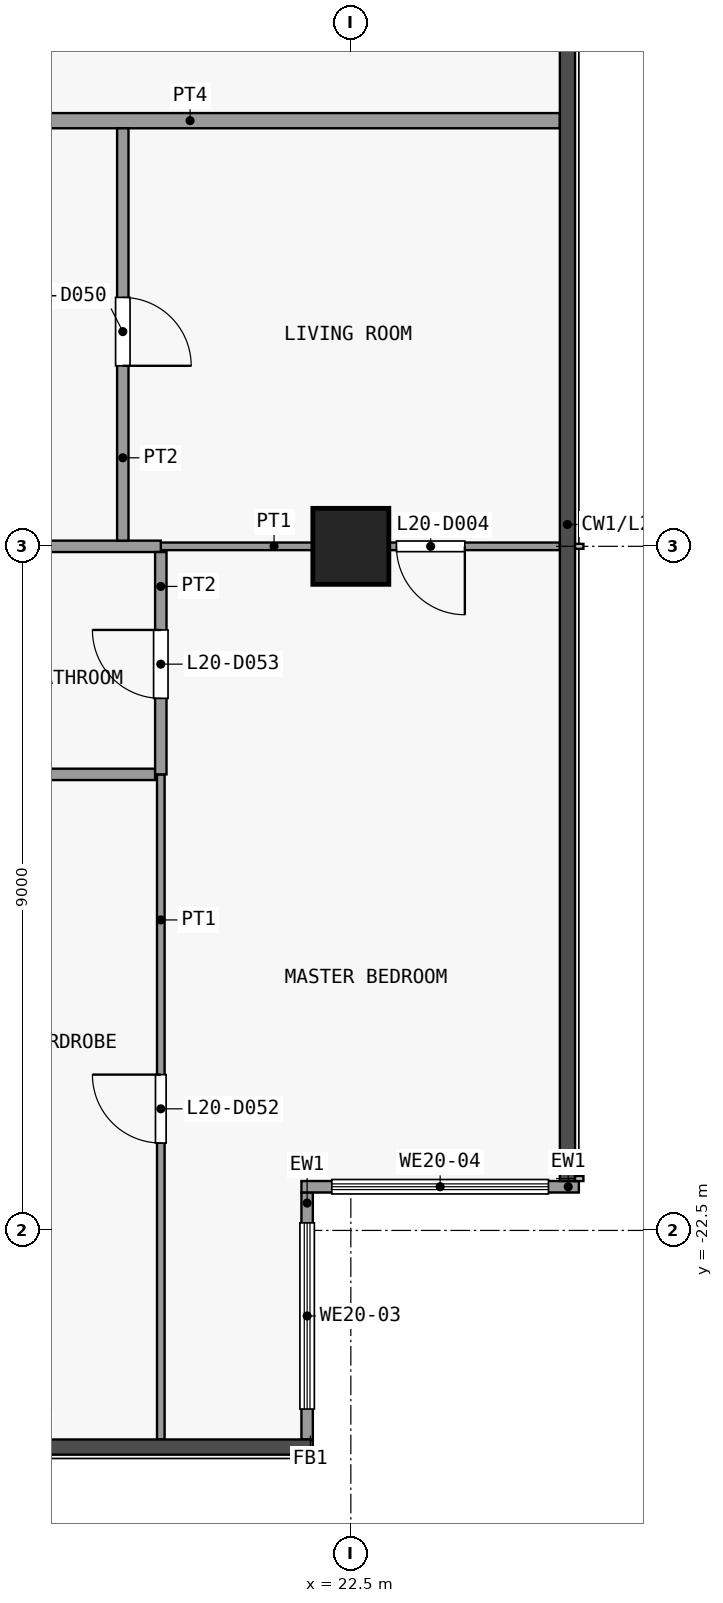
"""IFC4 building model, lengths in metres.
Left out: names, types, materials, properties, quantities, classifications, styles, units other than length and angle.
Written with IfcOpenShell. Run it as: python <this file> out.ifc"""

import sys

from ifc_helpers import new_model, si_unit, direction, frame, frame_2d, origin, origin_2d, place, context, subcontext, project, spatial, rectangle, extrude, element, fill, save


model = new_model("IFC4")
c1 = context("Model", 3, precision=1e-05, world=origin(), true_north=direction((0.0, 1.0)))
c2 = subcontext(c1, "Body", "Model", "MODEL_VIEW")
j1 = project(units=[si_unit("LENGTHUNIT", "METRE"), si_unit("PLANEANGLEUNIT", "RADIAN")], contexts=[c1])
p1 = place(None, origin())
s1 = spatial("IfcSite", under=j1, at=p1, CompositionType="ELEMENT")
p2 = place(p1, origin())
s2 = spatial("IfcBuilding", under=s1, at=p2, CompositionType="ELEMENT")
p3 = place(p2, frame((0.0, 0.0, 84.7)))
s3 = spatial("IfcBuildingStorey", under=s2, at=p3, CompositionType="ELEMENT", Elevation=84.7)
p4 = place(p3, frame((22.5, -13.5, 0.0), z_axis=(0.0, 0.0, 1.0), x_axis=(1.0, 0.0, 0.0)))
e1 = element("IfcColumn", 1, at=p4, inside=s3, PredefinedType="COLUMN", context=c2, shape_type="SweptSolid", body=[
    extrude(rectangle(XDim=1.0, YDim=1.0, at=origin_2d()), origin(), (0.0, 0.0, 1.0), 3.6),
])
p5 = place(p3, frame((21.925, -22.0, 0.0), z_axis=(0.0, 0.0, 1.0), x_axis=(0.0, -1.0, 0.0)))
e2 = element("IfcWall", 2, at=p5, inside=s3, PredefinedType="SOLIDWALL", context=c2, shape_type="SweptSolid", body=[
    extrude(rectangle(XDim=3.25, YDim=0.15, at=frame_2d((1.625, 0.0))), origin(), (0.0, 0.0, 1.0), 3.3),
])
p6 = place(p5, frame((0.4, 0.0, 0.9)))
e3 = element("IfcOpeningElement", 3, at=p6, cuts=e2, PredefinedType="OPENING", context=c2, shape_type="SweptSolid", body=[
    extrude(rectangle(XDim=2.45, YDim=2.4, at=frame_2d((1.225, 1.2))), frame((0.0, 0.085, 0.0), z_axis=(0.0, -1.0, 0.0), x_axis=(1.0, 0.0, 0.0)), (0.0, 0.0, 1.0), 0.17),
])
p7 = place(p3, frame((25.5, -21.925, 0.0), z_axis=(0.0, 0.0, 1.0), x_axis=(-1.0, 0.0, 0.0)))
e4 = element("IfcWall", 4, at=p7, inside=s3, PredefinedType="SOLIDWALL", context=c2, shape_type="SweptSolid", body=[
    extrude(rectangle(XDim=3.65, YDim=0.15, at=frame_2d((1.825, 0.0))), origin(), (0.0, 0.0, 1.0), 3.3),
])
p8 = place(p7, frame((0.4, 0.0, 0.9)))
e5 = element("IfcOpeningElement", 5, at=p8, cuts=e4, PredefinedType="OPENING", context=c2, shape_type="SweptSolid", body=[
    extrude(rectangle(XDim=2.85, YDim=2.4, at=frame_2d((1.425, 1.2))), frame((0.0, 0.085, 0.0), z_axis=(0.0, -1.0, 0.0), x_axis=(1.0, 0.0, 0.0)), (0.0, 0.0, 1.0), 0.17),
])
p9 = place(p3, frame((16.475, -16.5, 0.0), z_axis=(0.0, 0.0, 1.0), x_axis=(1.0, 0.0, 0.0)))
e6 = element("IfcWall", 6, at=p9, inside=s3, PredefinedType="PARTITIONING", context=c2, shape_type="SweptSolid", body=[
    extrude(rectangle(XDim=3.45, YDim=0.15, at=frame_2d((1.725, 0.0))), origin(), (0.0, 0.0, 1.0), 3.3),
])
p10 = place(p3, frame((20.0, -13.5, 0.0), z_axis=(0.0, 0.0, 1.0), x_axis=(1.0, 0.0, 0.0)))
e7 = element("IfcWall", 7, at=p10, inside=s3, PredefinedType="PARTITIONING", context=c2, shape_type="SweptSolid", body=[
    extrude(rectangle(XDim=5.25, YDim=0.1, at=frame_2d((2.625, 0.0))), origin(), (0.0, 0.0, 1.0), 3.3),
])
p11 = place(p10, frame((3.1, 0.0, 0.0)))
e8 = element("IfcOpeningElement", 8, at=p11, cuts=e7, PredefinedType="OPENING", context=c2, shape_type="SweptSolid", body=[
    extrude(rectangle(XDim=0.9, YDim=2.1, at=frame_2d((0.45, 1.05))), frame((0.0, 0.06, 0.0), z_axis=(0.0, -1.0, 0.0), x_axis=(1.0, 0.0, 0.0)), (0.0, 0.0, 1.0), 0.12),
])
p12 = place(p3, frame((16.475, -13.5, 0.0), z_axis=(0.0, 0.0, 1.0), x_axis=(1.0, 0.0, 0.0)))
e9 = element("IfcWall", 9, at=p12, inside=s3, PredefinedType="PARTITIONING", context=c2, shape_type="SweptSolid", body=[
    extrude(rectangle(XDim=3.525, YDim=0.15, at=frame_2d((1.762, 0.0))), origin(), (0.0, 0.0, 1.0), 3.3),
])
p13 = place(p3, frame((13.4, -7.9, 0.0), z_axis=(0.0, 0.0, 1.0), x_axis=(1.0, 0.0, 0.0)))
e10 = element("IfcWall", 10, at=p13, inside=s3, PredefinedType="PARTITIONING", context=c2, shape_type="SweptSolid", body=[
    extrude(rectangle(XDim=11.85, YDim=0.2, at=frame_2d((5.925, 0.0))), origin(), (0.0, 0.0, 1.0), 3.3),
])
p14 = place(p13, frame((1.0, 0.0, 0.0)))
e11 = element("IfcOpeningElement", 11, at=p14, cuts=e10, PredefinedType="OPENING", context=c2, shape_type="SweptSolid", body=[
    extrude(rectangle(XDim=1.0, YDim=2.1, at=frame_2d((0.5, 1.05))), frame((0.0, 0.11, 0.0), z_axis=(0.0, -1.0, 0.0), x_axis=(1.0, 0.0, 0.0)), (0.0, 0.0, 1.0), 0.22),
])
p15 = place(p3, frame((19.5, -13.425, 0.0), z_axis=(0.0, 0.0, 1.0), x_axis=(0.0, 1.0, 0.0)))
e12 = element("IfcWall", 12, at=p15, inside=s3, PredefinedType="PARTITIONING", context=c2, shape_type="SweptSolid", body=[
    extrude(rectangle(XDim=5.425, YDim=0.15, at=frame_2d((2.712, 0.0))), origin(), (0.0, 0.0, 1.0), 3.3),
])
p16 = place(p15, frame((2.3, 0.0, 0.0)))
e13 = element("IfcOpeningElement", 13, at=p16, cuts=e12, PredefinedType="OPENING", context=c2, shape_type="SweptSolid", body=[
    extrude(rectangle(XDim=0.9, YDim=2.1, at=frame_2d((0.45, 1.05))), frame((0.0, 0.085, 0.0), z_axis=(0.0, -1.0, 0.0), x_axis=(1.0, 0.0, 0.0)), (0.0, 0.0, 1.0), 0.17),
])
p17 = place(p3, frame((20.0, -25.25, 0.0), z_axis=(0.0, 0.0, 1.0), x_axis=(0.0, 1.0, 0.0)))
e14 = element("IfcWall", 14, at=p17, inside=s3, PredefinedType="PARTITIONING", context=c2, shape_type="SweptSolid", body=[
    extrude(rectangle(XDim=8.75, YDim=0.1, at=frame_2d((4.375, 0.0))), origin(), (0.0, 0.0, 1.0), 3.3),
])
p18 = place(p17, frame((3.9, 0.0, 0.0)))
e15 = element("IfcOpeningElement", 15, at=p18, cuts=e14, PredefinedType="OPENING", context=c2, shape_type="SweptSolid", body=[
    extrude(rectangle(XDim=0.9, YDim=2.1, at=frame_2d((0.45, 1.05))), frame((0.0, 0.06, 0.0), z_axis=(0.0, -1.0, 0.0), x_axis=(1.0, 0.0, 0.0)), (0.0, 0.0, 1.0), 0.12),
])
p19 = place(p3, frame((20.0, -16.5, 0.0), z_axis=(0.0, 0.0, 1.0), x_axis=(0.0, 1.0, 0.0)))
e16 = element("IfcWall", 16, at=p19, inside=s3, PredefinedType="PARTITIONING", context=c2, shape_type="SweptSolid", body=[
    extrude(rectangle(XDim=2.925, YDim=0.15, at=frame_2d((1.462, 0.0))), origin(), (0.0, 0.0, 1.0), 3.3),
])
p20 = place(p19, frame((1.0, 0.0, 0.0)))
e17 = element("IfcOpeningElement", 17, at=p20, cuts=e16, PredefinedType="OPENING", context=c2, shape_type="SweptSolid", body=[
    extrude(rectangle(XDim=0.9, YDim=2.1, at=frame_2d((0.45, 1.05))), frame((0.0, 0.085, 0.0), z_axis=(0.0, -1.0, 0.0), x_axis=(1.0, 0.0, 0.0)), (0.0, 0.0, 1.0), 0.17),
])
p21 = place(p6, origin())
e18 = element("IfcWindow", 18, at=p21, inside=s3, PartitioningType="SINGLE_PANEL", PredefinedType="WINDOW", context=c2, shape_type="SweptSolid", body=[
    extrude(rectangle(XDim=2.45, YDim=2.4, at=frame_2d((1.225, 1.2))), frame((0.0, 0.03, 0.0), z_axis=(0.0, -1.0, 0.0), x_axis=(1.0, 0.0, 0.0)), (0.0, 0.0, 1.0), 0.06),
])
fill(e3, e18)
p22 = place(p8, origin())
e19 = element("IfcWindow", 19, at=p22, inside=s3, PartitioningType="SINGLE_PANEL", PredefinedType="WINDOW", context=c2, shape_type="SweptSolid", body=[
    extrude(rectangle(XDim=2.85, YDim=2.4, at=frame_2d((1.425, 1.2))), frame((0.0, 0.03, 0.0), z_axis=(0.0, -1.0, 0.0), x_axis=(1.0, 0.0, 0.0)), (0.0, 0.0, 1.0), 0.06),
])
fill(e5, e19)
p23 = place(p11, origin())
e20 = element("IfcDoor", 20, at=p23, inside=s3, OperationType="SINGLE_SWING_RIGHT", PredefinedType="DOOR", context=c2, shape_type="SweptSolid", body=[
    extrude(rectangle(XDim=0.9, YDim=2.1, at=frame_2d((0.45, 1.05))), frame((0.0, 0.025, 0.0), z_axis=(0.0, -1.0, 0.0), x_axis=(1.0, 0.0, 0.0)), (0.0, 0.0, 1.0), 0.05),
])
fill(e8, e20)
p24 = place(p16, origin())
e21 = element("IfcDoor", 21, at=p24, inside=s3, OperationType="SINGLE_SWING_LEFT", PredefinedType="DOOR", context=c2, shape_type="SweptSolid", body=[
    extrude(rectangle(XDim=0.9, YDim=2.1, at=frame_2d((0.45, 1.05))), frame((0.0, 0.025, 0.0), z_axis=(0.0, -1.0, 0.0), x_axis=(1.0, 0.0, 0.0)), (0.0, 0.0, 1.0), 0.05),
])
fill(e13, e21)
p25 = place(p18, origin())
e22 = element("IfcDoor", 22, at=p25, inside=s3, OperationType="SINGLE_SWING_LEFT", PredefinedType="DOOR", context=c2, shape_type="SweptSolid", body=[
    extrude(rectangle(XDim=0.9, YDim=2.1, at=frame_2d((0.45, 1.05))), frame((0.0, 0.025, 0.0), z_axis=(0.0, -1.0, 0.0), x_axis=(1.0, 0.0, 0.0)), (0.0, 0.0, 1.0), 0.05),
])
fill(e15, e22)
p26 = place(p20, origin())
e23 = element("IfcDoor", 23, at=p26, inside=s3, OperationType="SINGLE_SWING_LEFT", PredefinedType="DOOR", context=c2, shape_type="SweptSolid", body=[
    extrude(rectangle(XDim=0.9, YDim=2.1, at=frame_2d((0.45, 1.05))), frame((0.0, 0.025, 0.0), z_axis=(0.0, -1.0, 0.0), x_axis=(1.0, 0.0, 0.0)), (0.0, 0.0, 1.0), 0.05),
])
fill(e17, e23)
save(model, sys.argv[1])
